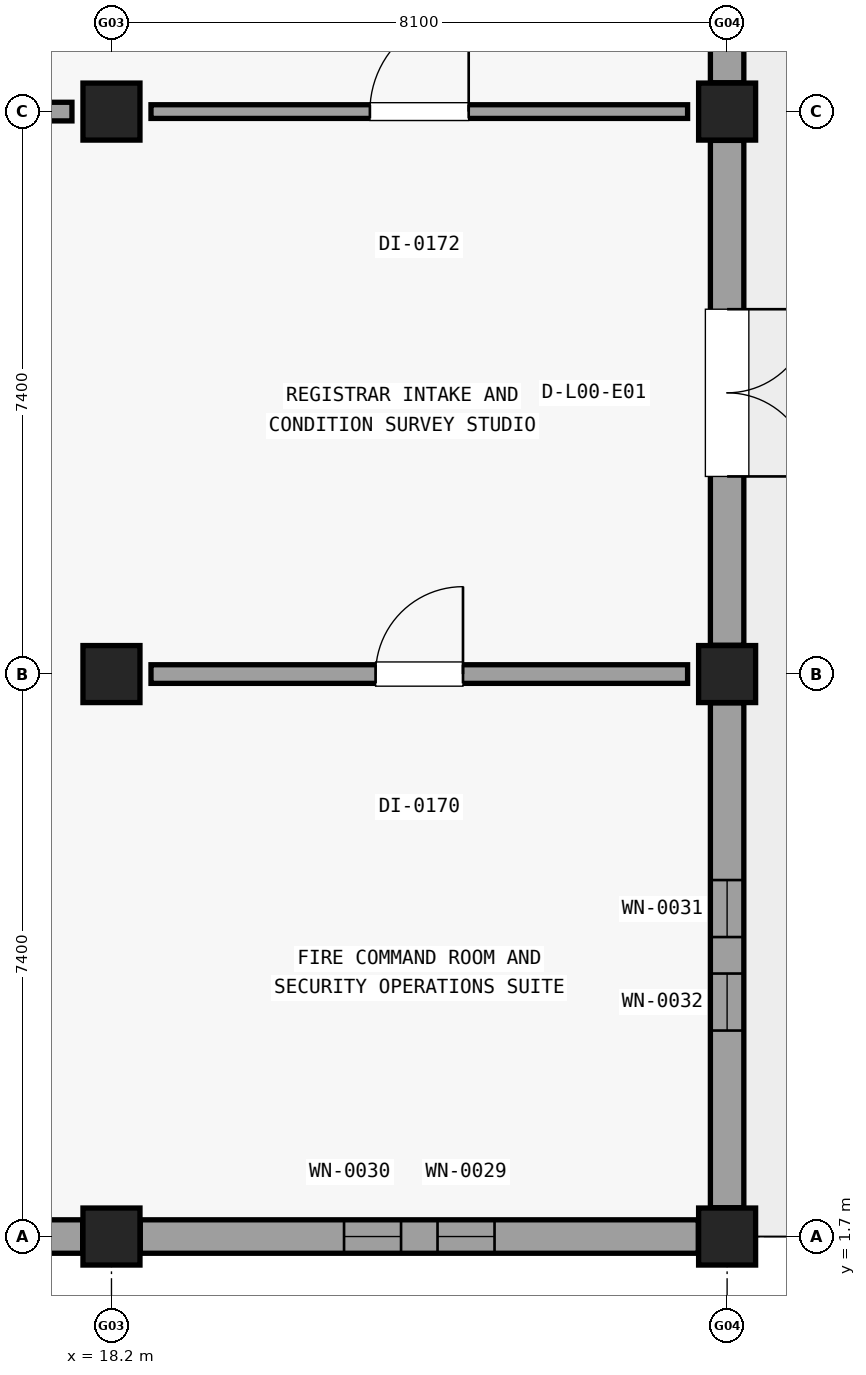
"""IFC4 building model, lengths in metres.
Left out: names, types, materials, properties, quantities, classifications, styles, units other than length and angle.
Written with IfcOpenShell. Run it as: python <this file> out.ifc"""

import sys

from ifc_helpers import new_model, si_unit, direction, frame, frame_2d, origin, origin_2d, place, context, subcontext, project, spatial, rectangle, extrude, element, fill, save


model = new_model("IFC4")
c1 = context("Model", 3, precision=1e-05, world=origin(), true_north=direction((0.0, 1.0)))
c2 = subcontext(c1, "Body", "Model", "MODEL_VIEW")
j1 = project(units=[si_unit("LENGTHUNIT", "METRE"), si_unit("PLANEANGLEUNIT", "RADIAN")], contexts=[c1])
p1 = place(None, origin())
s1 = spatial("IfcSite", under=j1, at=p1, CompositionType="ELEMENT")
p2 = place(p1, origin())
s2 = spatial("IfcBuilding", under=s1, at=p2, CompositionType="ELEMENT")
p3 = place(p2, origin())
s3 = spatial("IfcBuildingStorey", under=s2, at=p3, CompositionType="ELEMENT", Elevation=0.0)
for number, where, z_axis, x_axis in (
    (1, (18.2, 1.7, -0.28), (0.0, 0.0, 1.0), (1.0, 0.0, 0.0)),
    (2, (18.2, 9.1, -0.28), (0.0, 0.0, 1.0), (1.0, 0.0, 0.0)),
    (3, (18.2, 16.5, -0.28), (0.0, 0.0, 1.0), (1.0, 0.0, 0.0)),
    (4, (26.3, 1.7, -0.28), (0.0, 0.0, 1.0), (1.0, 0.0, 0.0)),
    (5, (26.3, 9.1, -0.28), (0.0, 0.0, 1.0), (1.0, 0.0, 0.0)),
    (6, (26.3, 16.5, -0.28), (0.0, 0.0, 1.0), (1.0, 0.0, 0.0)),
):
    element("IfcColumn", number, at=place(p3, frame(where, z_axis=z_axis, x_axis=x_axis)), inside=s3, PredefinedType="COLUMN", context=c2, shape_type="SweptSolid", body=[
        extrude(rectangle(XDim=0.75, YDim=0.75, at=origin_2d()), origin(), (0.0, 0.0, 1.0), 5.415),
    ])
p4 = place(p3, frame((17.821, 1.7, 0.0), z_axis=(0.0, 0.0, 1.0), x_axis=(-1.0, 0.0, 0.0)))
e7 = element("IfcWall", 7, at=p4, inside=s3, PredefinedType="SOLIDWALL", context=c2, shape_type="SweptSolid", body=[
    extrude(rectangle(XDim=7.342, YDim=0.44, at=frame_2d((3.671, 0.0))), origin(), (0.0, 0.0, 1.0), 4.27),
])
p5 = place(p4, frame((2.681, 0.0, 0.65)))
e8 = element("IfcOpeningElement", 8, at=p5, cuts=e7, PredefinedType="OPENING", context=c2, shape_type="SweptSolid", body=[
    extrude(rectangle(XDim=0.75, YDim=3.1, at=frame_2d((0.375, 1.55))), frame((0.0, 0.23, 0.0), z_axis=(0.0, -1.0, 0.0), x_axis=(1.0, 0.0, 0.0)), (0.0, 0.0, 1.0), 0.46),
])
p6 = place(p4, frame((3.911, 0.0, 0.65)))
e9 = element("IfcOpeningElement", 9, at=p6, cuts=e7, PredefinedType="OPENING", context=c2, shape_type="SweptSolid", body=[
    extrude(rectangle(XDim=0.75, YDim=3.1, at=frame_2d((0.375, 1.55))), frame((0.0, 0.23, 0.0), z_axis=(0.0, -1.0, 0.0), x_axis=(1.0, 0.0, 0.0)), (0.0, 0.0, 1.0), 0.46),
])
p7 = place(p3, frame((25.921, 1.7, 0.0), z_axis=(0.0, 0.0, 1.0), x_axis=(-1.0, 0.0, 0.0)))
e10 = element("IfcWall", 10, at=p7, inside=s3, PredefinedType="SOLIDWALL", context=c2, shape_type="SweptSolid", body=[
    extrude(rectangle(XDim=7.342, YDim=0.44, at=frame_2d((3.671, 0.0))), origin(), (0.0, 0.0, 1.0), 4.27),
])
p8 = place(p7, frame((2.681, 0.0, 0.65)))
e11 = element("IfcOpeningElement", 11, at=p8, cuts=e10, PredefinedType="OPENING", context=c2, shape_type="SweptSolid", body=[
    extrude(rectangle(XDim=0.75, YDim=3.1, at=frame_2d((0.375, 1.55))), frame((0.0, 0.23, 0.0), z_axis=(0.0, -1.0, 0.0), x_axis=(1.0, 0.0, 0.0)), (0.0, 0.0, 1.0), 0.46),
])
p9 = place(p7, frame((3.911, 0.0, 0.65)))
e12 = element("IfcOpeningElement", 12, at=p9, cuts=e10, PredefinedType="OPENING", context=c2, shape_type="SweptSolid", body=[
    extrude(rectangle(XDim=0.75, YDim=3.1, at=frame_2d((0.375, 1.55))), frame((0.0, 0.23, 0.0), z_axis=(0.0, -1.0, 0.0), x_axis=(1.0, 0.0, 0.0)), (0.0, 0.0, 1.0), 0.46),
])
p10 = place(p3, frame((26.3, 8.721, 0.0), z_axis=(0.0, 0.0, 1.0), x_axis=(0.0, -1.0, 0.0)))
e13 = element("IfcWall", 13, at=p10, inside=s3, PredefinedType="SOLIDWALL", context=c2, shape_type="SweptSolid", body=[
    extrude(rectangle(XDim=6.642, YDim=0.44, at=frame_2d((3.321, 0.0))), origin(), (0.0, 0.0, 1.0), 4.27),
])
p11 = place(p10, frame((2.331, 0.0, 0.65)))
e14 = element("IfcOpeningElement", 14, at=p11, cuts=e13, PredefinedType="OPENING", context=c2, shape_type="SweptSolid", body=[
    extrude(rectangle(XDim=0.75, YDim=3.1, at=frame_2d((0.375, 1.55))), frame((0.0, 0.23, 0.0), z_axis=(0.0, -1.0, 0.0), x_axis=(1.0, 0.0, 0.0)), (0.0, 0.0, 1.0), 0.46),
])
p12 = place(p10, frame((3.561, 0.0, 0.65)))
e15 = element("IfcOpeningElement", 15, at=p12, cuts=e13, PredefinedType="OPENING", context=c2, shape_type="SweptSolid", body=[
    extrude(rectangle(XDim=0.75, YDim=3.1, at=frame_2d((0.375, 1.55))), frame((0.0, 0.23, 0.0), z_axis=(0.0, -1.0, 0.0), x_axis=(1.0, 0.0, 0.0)), (0.0, 0.0, 1.0), 0.46),
])
p13 = place(p3, frame((26.3, 16.121, 0.0), z_axis=(0.0, 0.0, 1.0), x_axis=(0.0, -1.0, 0.0)))
e16 = element("IfcWall", 16, at=p13, inside=s3, PredefinedType="SOLIDWALL", context=c2, shape_type="SweptSolid", body=[
    extrude(rectangle(XDim=6.642, YDim=0.44, at=frame_2d((3.321, 0.0))), origin(), (0.0, 0.0, 1.0), 4.27),
])
p14 = place(p13, frame((2.221, 0.0, 0.0)))
e17 = element("IfcOpeningElement", 17, at=p14, cuts=e16, PredefinedType="OPENING", context=c2, shape_type="SweptSolid", body=[
    extrude(rectangle(XDim=2.2, YDim=2.4, at=frame_2d((1.1, 1.2))), frame((0.0, 0.23, 0.0), z_axis=(0.0, -1.0, 0.0), x_axis=(1.0, 0.0, 0.0)), (0.0, 0.0, 1.0), 0.46),
])
p15 = place(p3, frame((26.3, 23.521, 0.0), z_axis=(0.0, 0.0, 1.0), x_axis=(0.0, -1.0, 0.0)))
e18 = element("IfcWall", 18, at=p15, inside=s3, PredefinedType="SOLIDWALL", context=c2, shape_type="SweptSolid", body=[
    extrude(rectangle(XDim=6.642, YDim=0.44, at=frame_2d((3.321, 0.0))), origin(), (0.0, 0.0, 1.0), 4.27),
])
p16 = place(p15, frame((2.331, 0.0, 0.65)))
e19 = element("IfcOpeningElement", 19, at=p16, cuts=e18, PredefinedType="OPENING", context=c2, shape_type="SweptSolid", body=[
    extrude(rectangle(XDim=0.75, YDim=3.1, at=frame_2d((0.375, 1.55))), frame((0.0, 0.23, 0.0), z_axis=(0.0, -1.0, 0.0), x_axis=(1.0, 0.0, 0.0)), (0.0, 0.0, 1.0), 0.46),
])
p17 = place(p15, frame((3.561, 0.0, 0.65)))
e20 = element("IfcOpeningElement", 20, at=p17, cuts=e18, PredefinedType="OPENING", context=c2, shape_type="SweptSolid", body=[
    extrude(rectangle(XDim=0.75, YDim=3.1, at=frame_2d((0.375, 1.55))), frame((0.0, 0.23, 0.0), z_axis=(0.0, -1.0, 0.0), x_axis=(1.0, 0.0, 0.0)), (0.0, 0.0, 1.0), 0.46),
])
p18 = place(p3, frame((18.72, 9.1, 0.0), z_axis=(0.0, 0.0, 1.0), x_axis=(1.0, 0.0, 0.0)))
e21 = element("IfcWall", 21, at=p18, inside=s3, PredefinedType="PARTITIONING", context=c2, shape_type="SweptSolid", body=[
    extrude(rectangle(XDim=7.06, YDim=0.245, at=frame_2d((3.53, 0.0))), origin(), (0.0, 0.0, 1.0), 4.275),
])
p19 = place(p18, frame((2.955, 0.0, 0.0)))
e22 = element("IfcOpeningElement", 22, at=p19, cuts=e21, PredefinedType="OPENING", context=c2, shape_type="SweptSolid", body=[
    extrude(rectangle(XDim=1.15, YDim=2.15, at=frame_2d((0.575, 1.075))), frame((0.0, 0.133, 0.0), z_axis=(0.0, -1.0, 0.0), x_axis=(1.0, 0.0, 0.0)), (0.0, 0.0, 1.0), 0.265),
])
p20 = place(p3, frame((10.62, 16.5, 0.0), z_axis=(0.0, 0.0, 1.0), x_axis=(1.0, 0.0, 0.0)))
e23 = element("IfcWall", 23, at=p20, inside=s3, PredefinedType="PARTITIONING", context=c2, shape_type="SweptSolid", body=[
    extrude(rectangle(XDim=7.06, YDim=0.245, at=frame_2d((3.53, 0.0))), origin(), (0.0, 0.0, 1.0), 4.275),
])
p21 = place(p20, frame((2.43, 0.0, 0.0)))
e24 = element("IfcOpeningElement", 24, at=p21, cuts=e23, PredefinedType="OPENING", context=c2, shape_type="SweptSolid", body=[
    extrude(rectangle(XDim=2.2, YDim=2.65, at=frame_2d((1.1, 1.325))), frame((0.0, 0.133, 0.0), z_axis=(0.0, -1.0, 0.0), x_axis=(1.0, 0.0, 0.0)), (0.0, 0.0, 1.0), 0.265),
])
p22 = place(p3, frame((18.72, 16.5, 0.0), z_axis=(0.0, 0.0, 1.0), x_axis=(1.0, 0.0, 0.0)))
e25 = element("IfcWall", 25, at=p22, inside=s3, PredefinedType="PARTITIONING", context=c2, shape_type="SweptSolid", body=[
    extrude(rectangle(XDim=7.06, YDim=0.18, at=frame_2d((3.53, 0.0))), origin(), (0.0, 0.0, 1.0), 4.275),
])
p23 = place(p22, frame((2.88, 0.0, 0.0)))
e26 = element("IfcOpeningElement", 26, at=p23, cuts=e25, PredefinedType="OPENING", context=c2, shape_type="SweptSolid", body=[
    extrude(rectangle(XDim=1.3, YDim=2.2, at=frame_2d((0.65, 1.1))), frame((0.0, 0.1, 0.0), z_axis=(0.0, -1.0, 0.0), x_axis=(1.0, 0.0, 0.0)), (0.0, 0.0, 1.0), 0.2),
])
p24 = place(p8, origin())
e27 = element("IfcWindow", 27, at=p24, inside=s3, PartitioningType="SINGLE_PANEL", PredefinedType="WINDOW", context=c2, shape_type="SweptSolid", body=[
    extrude(rectangle(XDim=0.75, YDim=3.1, at=frame_2d((0.375, 1.55))), frame((0.0, 0.03, 0.0), z_axis=(0.0, -1.0, 0.0), x_axis=(1.0, 0.0, 0.0)), (0.0, 0.0, 1.0), 0.06),
])
fill(e11, e27)
p25 = place(p9, origin())
e28 = element("IfcWindow", 28, at=p25, inside=s3, PartitioningType="SINGLE_PANEL", PredefinedType="WINDOW", context=c2, shape_type="SweptSolid", body=[
    extrude(rectangle(XDim=0.75, YDim=3.1, at=frame_2d((0.375, 1.55))), frame((0.0, 0.03, 0.0), z_axis=(0.0, -1.0, 0.0), x_axis=(1.0, 0.0, 0.0)), (0.0, 0.0, 1.0), 0.06),
])
fill(e12, e28)
p26 = place(p11, origin())
e29 = element("IfcWindow", 29, at=p26, inside=s3, PartitioningType="SINGLE_PANEL", PredefinedType="WINDOW", context=c2, shape_type="SweptSolid", body=[
    extrude(rectangle(XDim=0.75, YDim=3.1, at=frame_2d((0.375, 1.55))), frame((0.0, 0.03, 0.0), z_axis=(0.0, -1.0, 0.0), x_axis=(1.0, 0.0, 0.0)), (0.0, 0.0, 1.0), 0.06),
])
fill(e14, e29)
p27 = place(p12, origin())
e30 = element("IfcWindow", 30, at=p27, inside=s3, PartitioningType="SINGLE_PANEL", PredefinedType="WINDOW", context=c2, shape_type="SweptSolid", body=[
    extrude(rectangle(XDim=0.75, YDim=3.1, at=frame_2d((0.375, 1.55))), frame((0.0, 0.03, 0.0), z_axis=(0.0, -1.0, 0.0), x_axis=(1.0, 0.0, 0.0)), (0.0, 0.0, 1.0), 0.06),
])
fill(e15, e30)
p28 = place(p14, origin())
e31 = element("IfcDoor", 31, at=p28, inside=s3, OperationType="DOUBLE_SWING_LEFT", PredefinedType="DOOR", context=c2, shape_type="SweptSolid", body=[
    extrude(rectangle(XDim=2.2, YDim=2.4, at=frame_2d((1.1, 1.2))), frame((0.0, 0.025, 0.0), z_axis=(0.0, -1.0, 0.0), x_axis=(1.0, 0.0, 0.0)), (0.0, 0.0, 1.0), 0.05),
])
fill(e17, e31)
p29 = place(p19, origin())
e32 = element("IfcDoor", 32, at=p29, inside=s3, OperationType="SINGLE_SWING_RIGHT", PredefinedType="DOOR", context=c2, shape_type="SweptSolid", body=[
    extrude(rectangle(XDim=1.15, YDim=2.15, at=frame_2d((0.575, 1.075))), frame((0.0, 0.025, 0.0), z_axis=(0.0, -1.0, 0.0), x_axis=(1.0, 0.0, 0.0)), (0.0, 0.0, 1.0), 0.05),
])
fill(e22, e32)
p30 = place(p23, origin())
e33 = element("IfcDoor", 33, at=p30, inside=s3, OperationType="SINGLE_SWING_RIGHT", PredefinedType="DOOR", context=c2, shape_type="SweptSolid", body=[
    extrude(rectangle(XDim=1.3, YDim=2.2, at=frame_2d((0.65, 1.1))), frame((0.0, 0.025, 0.0), z_axis=(0.0, -1.0, 0.0), x_axis=(1.0, 0.0, 0.0)), (0.0, 0.0, 1.0), 0.05),
])
fill(e26, e33)
save(model, sys.argv[1])
